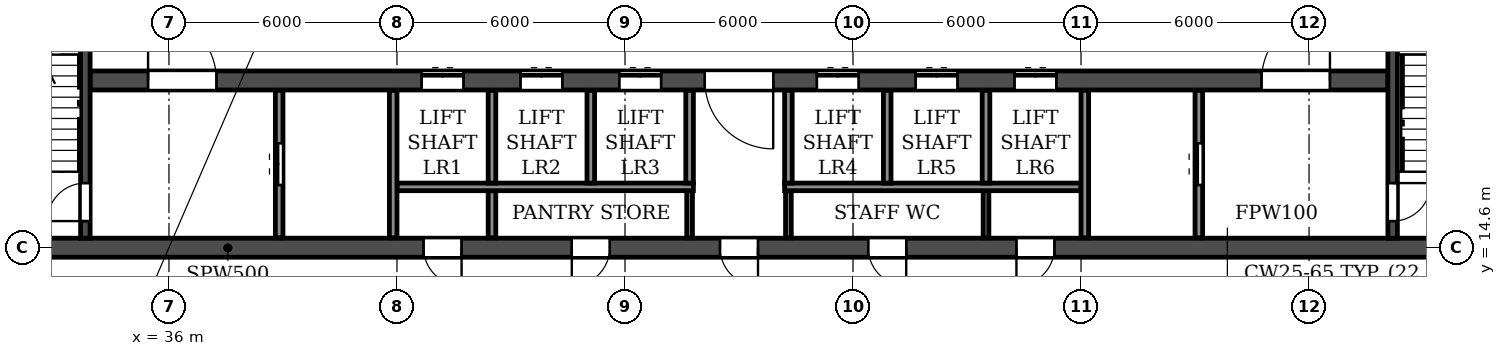
"""IFC4 building model, lengths in metres.
Left out: names, types, materials, properties, quantities, classifications, styles, units other than length and angle.
Written with IfcOpenShell. Run it as: python <this file> out.ifc"""

import sys

from ifc_helpers import new_model, si_unit, direction, frame, frame_2d, origin, place, context, subcontext, project, spatial, rectangle, extrude, element, fill, save


model = new_model("IFC4")
c1 = context("Model", 3, precision=1e-05, world=origin(), true_north=direction((0.0, 1.0)))
c2 = subcontext(c1, "Body", "Model", "MODEL_VIEW")
j1 = project(units=[si_unit("LENGTHUNIT", "METRE"), si_unit("PLANEANGLEUNIT", "RADIAN")], contexts=[c1])
p1 = place(None, origin())
s1 = spatial("IfcSite", under=j1, at=p1, CompositionType="ELEMENT")
p2 = place(p1, origin())
s2 = spatial("IfcBuilding", under=s1, at=p2, CompositionType="ELEMENT")
p3 = place(p2, frame((0.0, 0.0, 109.2)))
s3 = spatial("IfcBuildingStorey", under=s2, at=p3, CompositionType="ELEMENT", Elevation=109.2)
p4 = place(p3, frame((14.6, 14.6, 0.0), z_axis=(0.0, 0.0, 1.0), x_axis=(1.0, 0.0, 0.0)))
e1 = element("IfcWall", 1, at=p4, inside=s3, PredefinedType="SOLIDWALL", context=c2, shape_type="SweptSolid", body=[
    extrude(rectangle(XDim=72.8, YDim=0.5, at=frame_2d((36.4, 0.0))), origin(), (0.0, 0.0, 1.0), 3.06),
])
p5 = place(p4, frame((1.2, 0.0, 0.0)))
e2 = element("IfcOpeningElement", 2, at=p5, cuts=e1, PredefinedType="OPENING", context=c2, shape_type="SweptSolid", body=[
    extrude(rectangle(XDim=1.0, YDim=2.1, at=frame_2d((0.5, 1.05))), frame((0.0, 0.26, 0.0), z_axis=(0.0, -1.0, 0.0), x_axis=(1.0, 0.0, 0.0)), (0.0, 0.0, 1.0), 0.52),
])
p6 = place(p4, frame((4.3, 0.0, 0.0)))
e3 = element("IfcOpeningElement", 3, at=p6, cuts=e1, PredefinedType="OPENING", context=c2, shape_type="SweptSolid", body=[
    extrude(rectangle(XDim=1.0, YDim=2.1, at=frame_2d((0.5, 1.05))), frame((0.0, 0.26, 0.0), z_axis=(0.0, -1.0, 0.0), x_axis=(1.0, 0.0, 0.0)), (0.0, 0.0, 1.0), 0.52),
])
p7 = place(p4, frame((12.2, 0.0, 0.0)))
e4 = element("IfcOpeningElement", 4, at=p7, cuts=e1, PredefinedType="OPENING", context=c2, shape_type="SweptSolid", body=[
    extrude(rectangle(XDim=1.0, YDim=2.1, at=frame_2d((0.5, 1.05))), frame((0.0, 0.26, 0.0), z_axis=(0.0, -1.0, 0.0), x_axis=(1.0, 0.0, 0.0)), (0.0, 0.0, 1.0), 0.52),
])
p8 = place(p4, frame((16.8, 0.0, 0.0)))
e5 = element("IfcOpeningElement", 5, at=p8, cuts=e1, PredefinedType="OPENING", context=c2, shape_type="SweptSolid", body=[
    extrude(rectangle(XDim=1.0, YDim=2.1, at=frame_2d((0.5, 1.05))), frame((0.0, 0.26, 0.0), z_axis=(0.0, -1.0, 0.0), x_axis=(1.0, 0.0, 0.0)), (0.0, 0.0, 1.0), 0.52),
])
p9 = place(p4, frame((28.1, 0.0, 0.0)))
e6 = element("IfcOpeningElement", 6, at=p9, cuts=e1, PredefinedType="OPENING", context=c2, shape_type="SweptSolid", body=[
    extrude(rectangle(XDim=1.0, YDim=2.1, at=frame_2d((0.5, 1.05))), frame((0.0, 0.26, 0.0), z_axis=(0.0, -1.0, 0.0), x_axis=(1.0, 0.0, 0.0)), (0.0, 0.0, 1.0), 0.52),
])
p10 = place(p4, frame((32.0, 0.0, 0.0)))
e7 = element("IfcOpeningElement", 7, at=p10, cuts=e1, PredefinedType="OPENING", context=c2, shape_type="SweptSolid", body=[
    extrude(rectangle(XDim=1.0, YDim=2.1, at=frame_2d((0.5, 1.05))), frame((0.0, 0.26, 0.0), z_axis=(0.0, -1.0, 0.0), x_axis=(1.0, 0.0, 0.0)), (0.0, 0.0, 1.0), 0.52),
])
p11 = place(p4, frame((35.9, 0.0, 0.0)))
e8 = element("IfcOpeningElement", 8, at=p11, cuts=e1, PredefinedType="OPENING", context=c2, shape_type="SweptSolid", body=[
    extrude(rectangle(XDim=1.0, YDim=2.1, at=frame_2d((0.5, 1.05))), frame((0.0, 0.26, 0.0), z_axis=(0.0, -1.0, 0.0), x_axis=(1.0, 0.0, 0.0)), (0.0, 0.0, 1.0), 0.52),
])
p12 = place(p4, frame((39.8, 0.0, 0.0)))
e9 = element("IfcOpeningElement", 9, at=p12, cuts=e1, PredefinedType="OPENING", context=c2, shape_type="SweptSolid", body=[
    extrude(rectangle(XDim=1.0, YDim=2.1, at=frame_2d((0.5, 1.05))), frame((0.0, 0.26, 0.0), z_axis=(0.0, -1.0, 0.0), x_axis=(1.0, 0.0, 0.0)), (0.0, 0.0, 1.0), 0.52),
])
p13 = place(p4, frame((43.7, 0.0, 0.0)))
e10 = element("IfcOpeningElement", 10, at=p13, cuts=e1, PredefinedType="OPENING", context=c2, shape_type="SweptSolid", body=[
    extrude(rectangle(XDim=1.0, YDim=2.1, at=frame_2d((0.5, 1.05))), frame((0.0, 0.26, 0.0), z_axis=(0.0, -1.0, 0.0), x_axis=(1.0, 0.0, 0.0)), (0.0, 0.0, 1.0), 0.52),
])
p14 = place(p4, frame((55.0, 0.0, 0.0)))
e11 = element("IfcOpeningElement", 11, at=p14, cuts=e1, PredefinedType="OPENING", context=c2, shape_type="SweptSolid", body=[
    extrude(rectangle(XDim=1.0, YDim=2.1, at=frame_2d((0.5, 1.05))), frame((0.0, 0.26, 0.0), z_axis=(0.0, -1.0, 0.0), x_axis=(1.0, 0.0, 0.0)), (0.0, 0.0, 1.0), 0.52),
])
p15 = place(p4, frame((59.6, 0.0, 0.0)))
e12 = element("IfcOpeningElement", 12, at=p15, cuts=e1, PredefinedType="OPENING", context=c2, shape_type="SweptSolid", body=[
    extrude(rectangle(XDim=1.0, YDim=2.1, at=frame_2d((0.5, 1.05))), frame((0.0, 0.26, 0.0), z_axis=(0.0, -1.0, 0.0), x_axis=(1.0, 0.0, 0.0)), (0.0, 0.0, 1.0), 0.52),
])
p16 = place(p4, frame((67.5, 0.0, 0.0)))
e13 = element("IfcOpeningElement", 13, at=p16, cuts=e1, PredefinedType="OPENING", context=c2, shape_type="SweptSolid", body=[
    extrude(rectangle(XDim=1.0, YDim=2.1, at=frame_2d((0.5, 1.05))), frame((0.0, 0.26, 0.0), z_axis=(0.0, -1.0, 0.0), x_axis=(1.0, 0.0, 0.0)), (0.0, 0.0, 1.0), 0.52),
])
p17 = place(p4, frame((70.35, 0.0, 0.0)))
e14 = element("IfcOpeningElement", 14, at=p17, cuts=e1, PredefinedType="OPENING", context=c2, shape_type="SweptSolid", body=[
    extrude(rectangle(XDim=1.5, YDim=2.1, at=frame_2d((0.75, 1.05))), frame((0.0, 0.26, 0.0), z_axis=(0.0, -1.0, 0.0), x_axis=(1.0, 0.0, 0.0)), (0.0, 0.0, 1.0), 0.52),
])
p18 = place(p3, frame((33.925, 19.0, 0.0), z_axis=(0.0, 0.0, 1.0), x_axis=(1.0, 0.0, 0.0)))
e15 = element("IfcWall", 15, at=p18, inside=s3, PredefinedType="SOLIDWALL", context=c2, shape_type="SweptSolid", body=[
    extrude(rectangle(XDim=34.15, YDim=0.5, at=frame_2d((17.075, 0.0))), origin(), (0.0, 0.0, 1.0), 3.06),
])
p19 = place(p18, frame((16.175, 0.0, 0.0)))
e16 = element("IfcOpeningElement", 16, at=p19, cuts=e15, PredefinedType="OPENING", context=c2, shape_type="SweptSolid", body=[
    extrude(rectangle(XDim=1.8, YDim=2.1, at=frame_2d((0.9, 1.05))), frame((0.0, 0.26, 0.0), z_axis=(0.0, -1.0, 0.0), x_axis=(1.0, 0.0, 0.0)), (0.0, 0.0, 1.0), 0.52),
])
p20 = place(p18, frame((1.525, 0.0, 0.0)))
e17 = element("IfcOpeningElement", 17, at=p20, cuts=e15, PredefinedType="OPENING", context=c2, shape_type="SweptSolid", body=[
    extrude(rectangle(XDim=1.8, YDim=2.1, at=frame_2d((0.9, 1.05))), frame((0.0, 0.26, 0.0), z_axis=(0.0, -1.0, 0.0), x_axis=(1.0, 0.0, 0.0)), (0.0, 0.0, 1.0), 0.52),
])
p21 = place(p18, frame((8.725, 0.0, 0.0)))
e18 = element("IfcOpeningElement", 18, at=p21, cuts=e15, PredefinedType="OPENING", context=c2, shape_type="SweptSolid", body=[
    extrude(rectangle(XDim=1.1, YDim=2.1, at=frame_2d((0.55, 1.05))), frame((0.0, 0.26, 0.0), z_axis=(0.0, -1.0, 0.0), x_axis=(1.0, 0.0, 0.0)), (0.0, 0.0, 1.0), 0.52),
])
p22 = place(p18, frame((11.325, 0.0, 0.0)))
e19 = element("IfcOpeningElement", 19, at=p22, cuts=e15, PredefinedType="OPENING", context=c2, shape_type="SweptSolid", body=[
    extrude(rectangle(XDim=1.1, YDim=2.1, at=frame_2d((0.55, 1.05))), frame((0.0, 0.26, 0.0), z_axis=(0.0, -1.0, 0.0), x_axis=(1.0, 0.0, 0.0)), (0.0, 0.0, 1.0), 0.52),
])
p23 = place(p18, frame((13.925, 0.0, 0.0)))
e20 = element("IfcOpeningElement", 20, at=p23, cuts=e15, PredefinedType="OPENING", context=c2, shape_type="SweptSolid", body=[
    extrude(rectangle(XDim=1.1, YDim=2.1, at=frame_2d((0.55, 1.05))), frame((0.0, 0.26, 0.0), z_axis=(0.0, -1.0, 0.0), x_axis=(1.0, 0.0, 0.0)), (0.0, 0.0, 1.0), 0.52),
])
p24 = place(p18, frame((19.125, 0.0, 0.0)))
e21 = element("IfcOpeningElement", 21, at=p24, cuts=e15, PredefinedType="OPENING", context=c2, shape_type="SweptSolid", body=[
    extrude(rectangle(XDim=1.1, YDim=2.1, at=frame_2d((0.55, 1.05))), frame((0.0, 0.26, 0.0), z_axis=(0.0, -1.0, 0.0), x_axis=(1.0, 0.0, 0.0)), (0.0, 0.0, 1.0), 0.52),
])
p25 = place(p18, frame((21.725, 0.0, 0.0)))
e22 = element("IfcOpeningElement", 22, at=p25, cuts=e15, PredefinedType="OPENING", context=c2, shape_type="SweptSolid", body=[
    extrude(rectangle(XDim=1.1, YDim=2.1, at=frame_2d((0.55, 1.05))), frame((0.0, 0.26, 0.0), z_axis=(0.0, -1.0, 0.0), x_axis=(1.0, 0.0, 0.0)), (0.0, 0.0, 1.0), 0.52),
])
p26 = place(p18, frame((24.325, 0.0, 0.0)))
e23 = element("IfcOpeningElement", 23, at=p26, cuts=e15, PredefinedType="OPENING", context=c2, shape_type="SweptSolid", body=[
    extrude(rectangle(XDim=1.1, YDim=2.1, at=frame_2d((0.55, 1.05))), frame((0.0, 0.26, 0.0), z_axis=(0.0, -1.0, 0.0), x_axis=(1.0, 0.0, 0.0)), (0.0, 0.0, 1.0), 0.52),
])
p27 = place(p18, frame((30.825, 0.0, 0.0)))
e24 = element("IfcOpeningElement", 24, at=p27, cuts=e15, PredefinedType="OPENING", context=c2, shape_type="SweptSolid", body=[
    extrude(rectangle(XDim=1.8, YDim=2.1, at=frame_2d((0.9, 1.05))), frame((0.0, 0.26, 0.0), z_axis=(0.0, -1.0, 0.0), x_axis=(1.0, 0.0, 0.0)), (0.0, 0.0, 1.0), 0.52),
])
p28 = place(p3, frame((33.8, 14.85, 0.0), z_axis=(0.0, 0.0, 1.0), x_axis=(0.0, 1.0, 0.0)))
e25 = element("IfcWall", 25, at=p28, inside=s3, PredefinedType="SOLIDWALL", context=c2, shape_type="SweptSolid", body=[
    extrude(rectangle(XDim=7.625, YDim=0.25, at=frame_2d((3.812, 0.0))), origin(), (0.0, 0.0, 1.0), 3.06),
])
p29 = place(p28, frame((0.45, 0.0, 0.0)))
e26 = element("IfcOpeningElement", 26, at=p29, cuts=e25, PredefinedType="OPENING", context=c2, shape_type="SweptSolid", body=[
    extrude(rectangle(XDim=1.0, YDim=2.1, at=frame_2d((0.5, 1.05))), frame((0.0, 0.135, 0.0), z_axis=(0.0, -1.0, 0.0), x_axis=(1.0, 0.0, 0.0)), (0.0, 0.0, 1.0), 0.27),
])
p30 = place(p3, frame((68.2, 14.85, 0.0), z_axis=(0.0, 0.0, 1.0), x_axis=(0.0, 1.0, 0.0)))
e27 = element("IfcWall", 27, at=p30, inside=s3, PredefinedType="SOLIDWALL", context=c2, shape_type="SweptSolid", body=[
    extrude(rectangle(XDim=7.625, YDim=0.25, at=frame_2d((3.812, 0.0))), origin(), (0.0, 0.0, 1.0), 3.06),
])
p31 = place(p30, frame((0.45, 0.0, 0.0)))
e28 = element("IfcOpeningElement", 28, at=p31, cuts=e27, PredefinedType="OPENING", context=c2, shape_type="SweptSolid", body=[
    extrude(rectangle(XDim=1.0, YDim=2.1, at=frame_2d((0.5, 1.05))), frame((0.0, 0.135, 0.0), z_axis=(0.0, -1.0, 0.0), x_axis=(1.0, 0.0, 0.0)), (0.0, 0.0, 1.0), 0.27),
])
for number, where, z_axis, x_axis in (
    (29, (49.7, 14.86, 0.0), (0.0, 0.0, 1.0), (0.0, 1.0, 0.0)),
    (30, (52.3, 14.86, 0.0), (0.0, 0.0, 1.0), (0.0, 1.0, 0.0)),
    (31, (57.5, 14.86, 0.0), (0.0, 0.0, 1.0), (0.0, 1.0, 0.0)),
):
    element("IfcWall", number, at=place(p3, frame(where, z_axis=z_axis, x_axis=x_axis)), inside=s3, PredefinedType="PARTITIONING", context=c2, shape_type="SweptSolid", body=[
        extrude(rectangle(XDim=1.24, YDim=0.15, at=frame_2d((0.62, 0.0))), origin(), (0.0, 0.0, 1.0), 3.06),
    ])
p32 = place(p3, frame((44.5, 14.86, 0.0), z_axis=(0.0, 0.0, 1.0), x_axis=(0.0, 1.0, 0.0)))
e32 = element("IfcWall", 32, at=p32, inside=s3, PredefinedType="PARTITIONING", context=c2, shape_type="SweptSolid", body=[
    extrude(rectangle(XDim=1.24, YDim=0.2, at=frame_2d((0.62, 0.0))), origin(), (0.0, 0.0, 1.0), 3.06),
])
for number, where, z_axis, x_axis in (
    (33, (42.0, 16.2, 0.0), (0.0, 0.0, 1.0), (1.0, 0.0, 0.0)),
    (34, (52.2, 16.2, 0.0), (0.0, 0.0, 1.0), (1.0, 0.0, 0.0)),
):
    element("IfcWall", number, at=place(p3, frame(where, z_axis=z_axis, x_axis=x_axis)), inside=s3, PredefinedType="PARTITIONING", context=c2, shape_type="SweptSolid", body=[
        extrude(rectangle(XDim=7.8, YDim=0.2, at=frame_2d((3.9, 0.0))), origin(), (0.0, 0.0, 1.0), 3.06),
    ])
p33 = place(p3, frame((38.9, 14.86, 0.0), z_axis=(0.0, 0.0, 1.0), x_axis=(0.0, 1.0, 0.0)))
e35 = element("IfcWall", 35, at=p33, inside=s3, PredefinedType="PARTITIONING", context=c2, shape_type="SweptSolid", body=[
    extrude(rectangle(XDim=3.88, YDim=0.2, at=frame_2d((1.94, 0.0))), origin(), (0.0, 0.0, 1.0), 3.06),
])
p34 = place(p33, frame((1.39, 0.0, 0.0)))
e36 = element("IfcOpeningElement", 36, at=p34, cuts=e35, PredefinedType="OPENING", context=c2, shape_type="SweptSolid", body=[
    extrude(rectangle(XDim=1.1, YDim=2.1, at=frame_2d((0.55, 1.05))), frame((0.0, 0.11, 0.0), z_axis=(0.0, -1.0, 0.0), x_axis=(1.0, 0.0, 0.0)), (0.0, 0.0, 1.0), 0.22),
])
p35 = place(p3, frame((41.9, 14.86, 0.0), z_axis=(0.0, 0.0, 1.0), x_axis=(0.0, 1.0, 0.0)))
e37 = element("IfcWall", 37, at=p35, inside=s3, PredefinedType="PARTITIONING", context=c2, shape_type="SweptSolid", body=[
    extrude(rectangle(XDim=3.88, YDim=0.2, at=frame_2d((1.94, 0.0))), origin(), (0.0, 0.0, 1.0), 3.06),
])
for number, where, z_axis, x_axis in (
    (38, (44.5, 16.3, 0.0), (0.0, 0.0, 1.0), (0.0, 1.0, 0.0)),
    (39, (47.1, 16.3, 0.0), (0.0, 0.0, 1.0), (0.0, 1.0, 0.0)),
    (40, (49.7, 16.3, 0.0), (0.0, 0.0, 1.0), (0.0, 1.0, 0.0)),
    (41, (52.3, 16.3, 0.0), (0.0, 0.0, 1.0), (0.0, 1.0, 0.0)),
    (42, (54.9, 16.3, 0.0), (0.0, 0.0, 1.0), (0.0, 1.0, 0.0)),
    (43, (57.5, 16.3, 0.0), (0.0, 0.0, 1.0), (0.0, 1.0, 0.0)),
):
    element("IfcWall", number, at=place(p3, frame(where, z_axis=z_axis, x_axis=x_axis)), inside=s3, PredefinedType="PARTITIONING", context=c2, shape_type="SweptSolid", body=[
        extrude(rectangle(XDim=2.44, YDim=0.2, at=frame_2d((1.22, 0.0))), origin(), (0.0, 0.0, 1.0), 3.06),
    ])
p36 = place(p3, frame((60.1, 14.86, 0.0), z_axis=(0.0, 0.0, 1.0), x_axis=(0.0, 1.0, 0.0)))
e44 = element("IfcWall", 44, at=p36, inside=s3, PredefinedType="PARTITIONING", context=c2, shape_type="SweptSolid", body=[
    extrude(rectangle(XDim=3.88, YDim=0.2, at=frame_2d((1.94, 0.0))), origin(), (0.0, 0.0, 1.0), 3.06),
])
p37 = place(p3, frame((63.1, 14.86, 0.0), z_axis=(0.0, 0.0, 1.0), x_axis=(0.0, 1.0, 0.0)))
e45 = element("IfcWall", 45, at=p37, inside=s3, PredefinedType="PARTITIONING", context=c2, shape_type="SweptSolid", body=[
    extrude(rectangle(XDim=3.88, YDim=0.2, at=frame_2d((1.94, 0.0))), origin(), (0.0, 0.0, 1.0), 3.06),
])
p38 = place(p37, frame((1.39, 0.0, 0.0)))
e46 = element("IfcOpeningElement", 46, at=p38, cuts=e45, PredefinedType="OPENING", context=c2, shape_type="SweptSolid", body=[
    extrude(rectangle(XDim=1.1, YDim=2.1, at=frame_2d((0.55, 1.05))), frame((0.0, 0.11, 0.0), z_axis=(0.0, -1.0, 0.0), x_axis=(1.0, 0.0, 0.0)), (0.0, 0.0, 1.0), 0.22),
])
p39 = place(p9, frame((1.0, 0.0, 0.0), z_axis=(0.0, 0.0, 1.0), x_axis=(-1.0, 0.0, 0.0)))
e47 = element("IfcDoor", 47, at=p39, inside=s3, OperationType="SINGLE_SWING_LEFT", PredefinedType="DOOR", context=c2, shape_type="SweptSolid", body=[
    extrude(rectangle(XDim=1.0, YDim=2.1, at=frame_2d((0.5, 1.05))), frame((0.0, 0.025, 0.0), z_axis=(0.0, -1.0, 0.0), x_axis=(1.0, 0.0, 0.0)), (0.0, 0.0, 1.0), 0.05),
])
fill(e6, e47)
p40 = place(p10, frame((1.0, 0.0, 0.0), z_axis=(0.0, 0.0, 1.0), x_axis=(-1.0, 0.0, 0.0)))
e48 = element("IfcDoor", 48, at=p40, inside=s3, OperationType="SINGLE_SWING_RIGHT", PredefinedType="DOOR", context=c2, shape_type="SweptSolid", body=[
    extrude(rectangle(XDim=1.0, YDim=2.1, at=frame_2d((0.5, 1.05))), frame((0.0, 0.025, 0.0), z_axis=(0.0, -1.0, 0.0), x_axis=(1.0, 0.0, 0.0)), (0.0, 0.0, 1.0), 0.05),
])
fill(e7, e48)
p41 = place(p11, frame((1.0, 0.0, 0.0), z_axis=(0.0, 0.0, 1.0), x_axis=(-1.0, 0.0, 0.0)))
e49 = element("IfcDoor", 49, at=p41, inside=s3, OperationType="SINGLE_SWING_LEFT", PredefinedType="DOOR", context=c2, shape_type="SweptSolid", body=[
    extrude(rectangle(XDim=1.0, YDim=2.1, at=frame_2d((0.5, 1.05))), frame((0.0, 0.025, 0.0), z_axis=(0.0, -1.0, 0.0), x_axis=(1.0, 0.0, 0.0)), (0.0, 0.0, 1.0), 0.05),
])
fill(e8, e49)
p42 = place(p12, frame((1.0, 0.0, 0.0), z_axis=(0.0, 0.0, 1.0), x_axis=(-1.0, 0.0, 0.0)))
e50 = element("IfcDoor", 50, at=p42, inside=s3, OperationType="SINGLE_SWING_LEFT", PredefinedType="DOOR", context=c2, shape_type="SweptSolid", body=[
    extrude(rectangle(XDim=1.0, YDim=2.1, at=frame_2d((0.5, 1.05))), frame((0.0, 0.025, 0.0), z_axis=(0.0, -1.0, 0.0), x_axis=(1.0, 0.0, 0.0)), (0.0, 0.0, 1.0), 0.05),
])
fill(e9, e50)
p43 = place(p13, frame((1.0, 0.0, 0.0), z_axis=(0.0, 0.0, 1.0), x_axis=(-1.0, 0.0, 0.0)))
e51 = element("IfcDoor", 51, at=p43, inside=s3, OperationType="SINGLE_SWING_RIGHT", PredefinedType="DOOR", context=c2, shape_type="SweptSolid", body=[
    extrude(rectangle(XDim=1.0, YDim=2.1, at=frame_2d((0.5, 1.05))), frame((0.0, 0.025, 0.0), z_axis=(0.0, -1.0, 0.0), x_axis=(1.0, 0.0, 0.0)), (0.0, 0.0, 1.0), 0.05),
])
fill(e10, e51)
p44 = place(p38, origin())
e52 = element("IfcDoor", 52, at=p44, inside=s3, OperationType="DOUBLE_DOOR_SLIDING", PredefinedType="DOOR", context=c2, shape_type="SweptSolid", body=[
    extrude(rectangle(XDim=1.1, YDim=2.1, at=frame_2d((0.55, 1.05))), frame((0.0, 0.025, 0.0), z_axis=(0.0, -1.0, 0.0), x_axis=(1.0, 0.0, 0.0)), (0.0, 0.0, 1.0), 0.05),
])
fill(e46, e52)
p45 = place(p31, frame((1.0, 0.0, 0.0), z_axis=(0.0, 0.0, 1.0), x_axis=(-1.0, 0.0, 0.0)))
e53 = element("IfcDoor", 53, at=p45, inside=s3, OperationType="SINGLE_SWING_LEFT", PredefinedType="DOOR", context=c2, shape_type="SweptSolid", body=[
    extrude(rectangle(XDim=1.0, YDim=2.1, at=frame_2d((0.5, 1.05))), frame((0.0, 0.025, 0.0), z_axis=(0.0, -1.0, 0.0), x_axis=(1.0, 0.0, 0.0)), (0.0, 0.0, 1.0), 0.05),
])
fill(e28, e53)
p46 = place(p29, origin())
e54 = element("IfcDoor", 54, at=p46, inside=s3, OperationType="SINGLE_SWING_LEFT", PredefinedType="DOOR", context=c2, shape_type="SweptSolid", body=[
    extrude(rectangle(XDim=1.0, YDim=2.1, at=frame_2d((0.5, 1.05))), frame((0.0, 0.025, 0.0), z_axis=(0.0, -1.0, 0.0), x_axis=(1.0, 0.0, 0.0)), (0.0, 0.0, 1.0), 0.05),
])
fill(e26, e54)
p47 = place(p34, origin())
e55 = element("IfcDoor", 55, at=p47, inside=s3, OperationType="DOUBLE_DOOR_SLIDING", PredefinedType="DOOR", context=c2, shape_type="SweptSolid", body=[
    extrude(rectangle(XDim=1.1, YDim=2.1, at=frame_2d((0.55, 1.05))), frame((0.0, 0.025, 0.0), z_axis=(0.0, -1.0, 0.0), x_axis=(1.0, 0.0, 0.0)), (0.0, 0.0, 1.0), 0.05),
])
fill(e36, e55)
p48 = place(p19, frame((1.8, 0.0, 0.0), z_axis=(0.0, 0.0, 1.0), x_axis=(-1.0, 0.0, 0.0)))
e56 = element("IfcDoor", 56, at=p48, inside=s3, OperationType="DOUBLE_DOOR_SINGLE_SWING", PredefinedType="DOOR", context=c2, shape_type="SweptSolid", body=[
    extrude(rectangle(XDim=1.8, YDim=2.1, at=frame_2d((0.9, 1.05))), frame((0.0, 0.025, 0.0), z_axis=(0.0, -1.0, 0.0), x_axis=(1.0, 0.0, 0.0)), (0.0, 0.0, 1.0), 0.05),
])
fill(e16, e56)
p49 = place(p20, origin())
e57 = element("IfcDoor", 57, at=p49, inside=s3, OperationType="DOUBLE_DOOR_SINGLE_SWING", PredefinedType="DOOR", context=c2, shape_type="SweptSolid", body=[
    extrude(rectangle(XDim=1.8, YDim=2.1, at=frame_2d((0.9, 1.05))), frame((0.0, 0.025, 0.0), z_axis=(0.0, -1.0, 0.0), x_axis=(1.0, 0.0, 0.0)), (0.0, 0.0, 1.0), 0.05),
])
fill(e17, e57)
p50 = place(p21, origin())
e58 = element("IfcDoor", 58, at=p50, inside=s3, OperationType="DOUBLE_DOOR_SLIDING", PredefinedType="DOOR", context=c2, shape_type="SweptSolid", body=[
    extrude(rectangle(XDim=1.1, YDim=2.1, at=frame_2d((0.55, 1.05))), frame((0.0, 0.025, 0.0), z_axis=(0.0, -1.0, 0.0), x_axis=(1.0, 0.0, 0.0)), (0.0, 0.0, 1.0), 0.05),
])
fill(e18, e58)
p51 = place(p22, origin())
e59 = element("IfcDoor", 59, at=p51, inside=s3, OperationType="DOUBLE_DOOR_SLIDING", PredefinedType="DOOR", context=c2, shape_type="SweptSolid", body=[
    extrude(rectangle(XDim=1.1, YDim=2.1, at=frame_2d((0.55, 1.05))), frame((0.0, 0.025, 0.0), z_axis=(0.0, -1.0, 0.0), x_axis=(1.0, 0.0, 0.0)), (0.0, 0.0, 1.0), 0.05),
])
fill(e19, e59)
p52 = place(p23, origin())
e60 = element("IfcDoor", 60, at=p52, inside=s3, OperationType="DOUBLE_DOOR_SLIDING", PredefinedType="DOOR", context=c2, shape_type="SweptSolid", body=[
    extrude(rectangle(XDim=1.1, YDim=2.1, at=frame_2d((0.55, 1.05))), frame((0.0, 0.025, 0.0), z_axis=(0.0, -1.0, 0.0), x_axis=(1.0, 0.0, 0.0)), (0.0, 0.0, 1.0), 0.05),
])
fill(e20, e60)
p53 = place(p24, origin())
e61 = element("IfcDoor", 61, at=p53, inside=s3, OperationType="DOUBLE_DOOR_SLIDING", PredefinedType="DOOR", context=c2, shape_type="SweptSolid", body=[
    extrude(rectangle(XDim=1.1, YDim=2.1, at=frame_2d((0.55, 1.05))), frame((0.0, 0.025, 0.0), z_axis=(0.0, -1.0, 0.0), x_axis=(1.0, 0.0, 0.0)), (0.0, 0.0, 1.0), 0.05),
])
fill(e21, e61)
p54 = place(p25, origin())
e62 = element("IfcDoor", 62, at=p54, inside=s3, OperationType="DOUBLE_DOOR_SLIDING", PredefinedType="DOOR", context=c2, shape_type="SweptSolid", body=[
    extrude(rectangle(XDim=1.1, YDim=2.1, at=frame_2d((0.55, 1.05))), frame((0.0, 0.025, 0.0), z_axis=(0.0, -1.0, 0.0), x_axis=(1.0, 0.0, 0.0)), (0.0, 0.0, 1.0), 0.05),
])
fill(e22, e62)
p55 = place(p26, origin())
e63 = element("IfcDoor", 63, at=p55, inside=s3, OperationType="DOUBLE_DOOR_SLIDING", PredefinedType="DOOR", context=c2, shape_type="SweptSolid", body=[
    extrude(rectangle(XDim=1.1, YDim=2.1, at=frame_2d((0.55, 1.05))), frame((0.0, 0.025, 0.0), z_axis=(0.0, -1.0, 0.0), x_axis=(1.0, 0.0, 0.0)), (0.0, 0.0, 1.0), 0.05),
])
fill(e23, e63)
p56 = place(p27, origin())
e64 = element("IfcDoor", 64, at=p56, inside=s3, OperationType="DOUBLE_DOOR_SINGLE_SWING", PredefinedType="DOOR", context=c2, shape_type="SweptSolid", body=[
    extrude(rectangle(XDim=1.8, YDim=2.1, at=frame_2d((0.9, 1.05))), frame((0.0, 0.025, 0.0), z_axis=(0.0, -1.0, 0.0), x_axis=(1.0, 0.0, 0.0)), (0.0, 0.0, 1.0), 0.05),
])
fill(e24, e64)
save(model, sys.argv[1])
